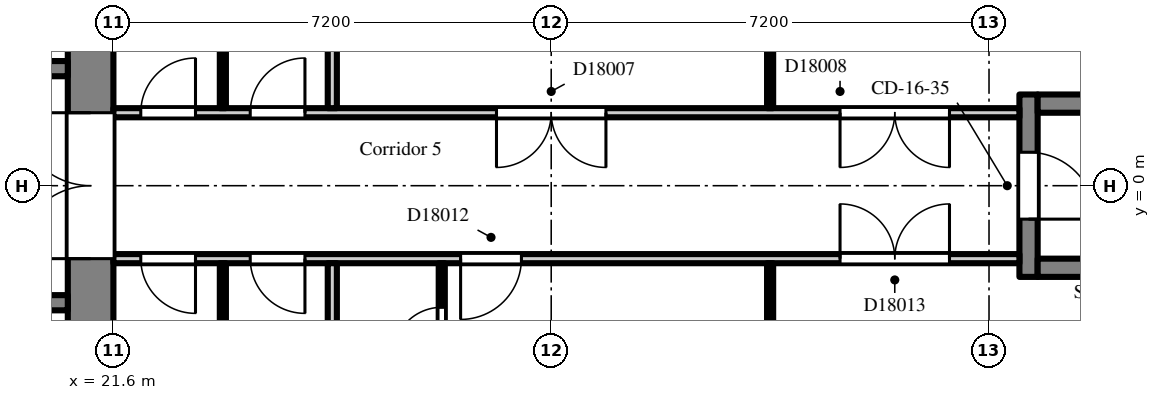
"""IFC4 building model, lengths in metres.
Left out: names, types, materials, properties, quantities, classifications, styles, units other than length and angle.
Written with IfcOpenShell. Run it as: python <this file> out.ifc"""

import sys

from ifc_helpers import new_model, si_unit, direction, frame, frame_2d, origin, place, context, subcontext, project, spatial, rectangle, extrude, element, fill, save


model = new_model("IFC4")
c1 = context("Model", 3, precision=1e-05, world=origin(), true_north=direction((0.0, 1.0)))
c2 = subcontext(c1, "Body", "Model", "MODEL_VIEW")
j1 = project(units=[si_unit("LENGTHUNIT", "METRE"), si_unit("PLANEANGLEUNIT", "RADIAN")], contexts=[c1])
p1 = place(None, origin())
s1 = spatial("IfcSite", under=j1, at=p1, CompositionType="ELEMENT")
p2 = place(p1, origin())
s2 = spatial("IfcBuilding", under=s1, at=p2, CompositionType="ELEMENT")
p3 = place(p2, frame((0.0, 0.0, 123.3)))
s3 = spatial("IfcBuildingStorey", under=s2, at=p3, CompositionType="ELEMENT", Elevation=123.3)
p4 = place(p3, frame((21.225, -7.2, 0.0), z_axis=(0.0, 0.0, 1.0), x_axis=(0.0, 1.0, 0.0)))
e1 = element("IfcWall", 1, at=p4, inside=s3, PredefinedType="SHEAR", context=c2, shape_type="SweptSolid", body=[
    extrude(rectangle(XDim=14.4, YDim=0.75, at=frame_2d((7.2, 0.0))), origin(), (0.0, 0.0, 1.0), 2.6),
])
p5 = place(p4, frame((6.0, 0.0, 0.0)))
e2 = element("IfcOpeningElement", 2, at=p5, cuts=e1, PredefinedType="OPENING", context=c2, shape_type="SweptSolid", body=[
    extrude(rectangle(XDim=2.4, YDim=2.2, at=frame_2d((1.2, 1.1))), frame((0.0, 0.385, 0.0), z_axis=(0.0, -1.0, 0.0), x_axis=(1.0, 0.0, 0.0)), (0.0, 0.0, 1.0), 0.77),
])
p6 = place(p3, frame((7.9, 1.925, 0.0), z_axis=(0.0, 0.0, 1.0), x_axis=(1.0, 0.0, 0.0)))
e3 = element("IfcWall", 3, at=p6, inside=s3, PredefinedType="SHEAR", context=c2, shape_type="SweptSolid", body=[
    extrude(rectangle(XDim=12.95, YDim=0.25, at=frame_2d((6.475, 0.0))), origin(), (0.0, 0.0, 1.0), 2.6),
])
p7 = place(p6, frame((4.825, 0.0, 0.0)))
e4 = element("IfcOpeningElement", 4, at=p7, cuts=e3, PredefinedType="OPENING", context=c2, shape_type="SweptSolid", body=[
    extrude(rectangle(XDim=1.1, YDim=2.1, at=frame_2d((0.55, 1.05))), frame((0.0, 0.135, 0.0), z_axis=(0.0, -1.0, 0.0), x_axis=(1.0, 0.0, 0.0)), (0.0, 0.0, 1.0), 0.27),
])
p8 = place(p6, frame((7.025, 0.0, 0.0)))
e5 = element("IfcOpeningElement", 5, at=p8, cuts=e3, PredefinedType="OPENING", context=c2, shape_type="SweptSolid", body=[
    extrude(rectangle(XDim=1.1, YDim=2.1, at=frame_2d((0.55, 1.05))), frame((0.0, 0.135, 0.0), z_axis=(0.0, -1.0, 0.0), x_axis=(1.0, 0.0, 0.0)), (0.0, 0.0, 1.0), 0.27),
])
p9 = place(p6, frame((9.225, 0.0, 0.0)))
e6 = element("IfcOpeningElement", 6, at=p9, cuts=e3, PredefinedType="OPENING", context=c2, shape_type="SweptSolid", body=[
    extrude(rectangle(XDim=1.1, YDim=2.1, at=frame_2d((0.55, 1.05))), frame((0.0, 0.135, 0.0), z_axis=(0.0, -1.0, 0.0), x_axis=(1.0, 0.0, 0.0)), (0.0, 0.0, 1.0), 0.27),
])
p10 = place(p6, frame((0.525, 0.0, 0.0)))
e7 = element("IfcOpeningElement", 7, at=p10, cuts=e3, PredefinedType="OPENING", context=c2, shape_type="SweptSolid", body=[
    extrude(rectangle(XDim=0.9, YDim=2.1, at=frame_2d((0.45, 1.05))), frame((0.0, 0.135, 0.0), z_axis=(0.0, -1.0, 0.0), x_axis=(1.0, 0.0, 0.0)), (0.0, 0.0, 1.0), 0.27),
])
p11 = place(p6, frame((2.625, 0.0, 0.0)))
e8 = element("IfcOpeningElement", 8, at=p11, cuts=e3, PredefinedType="OPENING", context=c2, shape_type="SweptSolid", body=[
    extrude(rectangle(XDim=1.1, YDim=2.1, at=frame_2d((0.55, 1.05))), frame((0.0, 0.135, 0.0), z_axis=(0.0, -1.0, 0.0), x_axis=(1.0, 0.0, 0.0)), (0.0, 0.0, 1.0), 0.27),
])
p12 = place(p6, frame((11.525, 0.0, 0.0)))
e9 = element("IfcOpeningElement", 9, at=p12, cuts=e3, PredefinedType="OPENING", context=c2, shape_type="SweptSolid", body=[
    extrude(rectangle(XDim=0.9, YDim=2.1, at=frame_2d((0.45, 1.05))), frame((0.0, 0.135, 0.0), z_axis=(0.0, -1.0, 0.0), x_axis=(1.0, 0.0, 0.0)), (0.0, 0.0, 1.0), 0.27),
])
p13 = place(p3, frame((7.9, -1.925, 0.0), z_axis=(0.0, 0.0, 1.0), x_axis=(1.0, 0.0, 0.0)))
e10 = element("IfcWall", 10, at=p13, inside=s3, PredefinedType="SHEAR", context=c2, shape_type="SweptSolid", body=[
    extrude(rectangle(XDim=12.95, YDim=0.25, at=frame_2d((6.475, 0.0))), origin(), (0.0, 0.0, 1.0), 2.6),
])
p14 = place(p13, frame((0.525, 0.0, 0.0)))
e11 = element("IfcOpeningElement", 11, at=p14, cuts=e10, PredefinedType="OPENING", context=c2, shape_type="SweptSolid", body=[
    extrude(rectangle(XDim=0.9, YDim=2.1, at=frame_2d((0.45, 1.05))), frame((0.0, 0.135, 0.0), z_axis=(0.0, -1.0, 0.0), x_axis=(1.0, 0.0, 0.0)), (0.0, 0.0, 1.0), 0.27),
])
p15 = place(p13, frame((2.625, 0.0, 0.0)))
e12 = element("IfcOpeningElement", 12, at=p15, cuts=e10, PredefinedType="OPENING", context=c2, shape_type="SweptSolid", body=[
    extrude(rectangle(XDim=1.1, YDim=2.1, at=frame_2d((0.55, 1.05))), frame((0.0, 0.135, 0.0), z_axis=(0.0, -1.0, 0.0), x_axis=(1.0, 0.0, 0.0)), (0.0, 0.0, 1.0), 0.27),
])
p16 = place(p13, frame((4.925, 0.0, 0.0)))
e13 = element("IfcOpeningElement", 13, at=p16, cuts=e10, PredefinedType="OPENING", context=c2, shape_type="SweptSolid", body=[
    extrude(rectangle(XDim=0.9, YDim=2.1, at=frame_2d((0.45, 1.05))), frame((0.0, 0.135, 0.0), z_axis=(0.0, -1.0, 0.0), x_axis=(1.0, 0.0, 0.0)), (0.0, 0.0, 1.0), 0.27),
])
p17 = place(p13, frame((8.225, 0.0, 0.0)))
e14 = element("IfcOpeningElement", 14, at=p17, cuts=e10, PredefinedType="OPENING", context=c2, shape_type="SweptSolid", body=[
    extrude(rectangle(XDim=0.9, YDim=2.1, at=frame_2d((0.45, 1.05))), frame((0.0, 0.135, 0.0), z_axis=(0.0, -1.0, 0.0), x_axis=(1.0, 0.0, 0.0)), (0.0, 0.0, 1.0), 0.27),
])
p18 = place(p13, frame((11.525, 0.0, 0.0)))
e15 = element("IfcOpeningElement", 15, at=p18, cuts=e10, PredefinedType="OPENING", context=c2, shape_type="SweptSolid", body=[
    extrude(rectangle(XDim=0.9, YDim=2.1, at=frame_2d((0.45, 1.05))), frame((0.0, 0.135, 0.0), z_axis=(0.0, -1.0, 0.0), x_axis=(1.0, 0.0, 0.0)), (0.0, 0.0, 1.0), 0.27),
])
p19 = place(p3, frame((36.65, -1.5, 0.0), z_axis=(0.0, 0.0, 1.0), x_axis=(0.0, 1.0, 0.0)))
e16 = element("IfcWall", 16, at=p19, inside=s3, PredefinedType="SHEAR", context=c2, shape_type="SweptSolid", body=[
    extrude(rectangle(XDim=3.0, YDim=0.3, at=frame_2d((1.5, 0.0))), origin(), (0.0, 0.0, 1.0), 2.6),
])
p20 = place(p19, frame((0.95, 0.0, 0.0)))
e17 = element("IfcOpeningElement", 17, at=p20, cuts=e16, PredefinedType="OPENING", context=c2, shape_type="SweptSolid", body=[
    extrude(rectangle(XDim=1.1, YDim=2.1, at=frame_2d((0.55, 1.05))), frame((0.0, 0.16, 0.0), z_axis=(0.0, -1.0, 0.0), x_axis=(1.0, 0.0, 0.0)), (0.0, 0.0, 1.0), 0.32),
])
for number, where, z_axis, x_axis in (
    (18, (36.8, -1.35, 0.0), (0.0, 0.0, 1.0), (1.0, 0.0, 0.0)),
    (19, (36.8, 1.35, 0.0), (0.0, 0.0, 1.0), (1.0, 0.0, 0.0)),
):
    element("IfcWall", number, at=place(p3, frame(where, z_axis=z_axis, x_axis=x_axis)), inside=s3, PredefinedType="SHEAR", context=c2, shape_type="SweptSolid", body=[
        extrude(rectangle(XDim=5.8, YDim=0.3, at=frame_2d((2.9, 0.0))), origin(), (0.0, 0.0, 1.0), 2.6),
    ])
p21 = place(p3, frame((21.6, -1.2, 0.0), z_axis=(0.0, 0.0, 1.0), x_axis=(1.0, 0.0, 0.0)))
e20 = element("IfcWall", 20, at=p21, inside=s3, PredefinedType="PARTITIONING", context=c2, shape_type="SweptSolid", body=[
    extrude(rectangle(XDim=14.9, YDim=0.15, at=frame_2d((7.45, 0.0))), origin(), (0.0, 0.0, 1.0), 2.6),
])
p22 = place(p21, frame((0.45, 0.0, 0.0)))
e21 = element("IfcOpeningElement", 21, at=p22, cuts=e20, PredefinedType="OPENING", context=c2, shape_type="SweptSolid", body=[
    extrude(rectangle(XDim=0.9, YDim=2.1, at=frame_2d((0.45, 1.05))), frame((0.0, 0.085, 0.0), z_axis=(0.0, -1.0, 0.0), x_axis=(1.0, 0.0, 0.0)), (0.0, 0.0, 1.0), 0.17),
])
p23 = place(p21, frame((2.25, 0.0, 0.0)))
e22 = element("IfcOpeningElement", 22, at=p23, cuts=e20, PredefinedType="OPENING", context=c2, shape_type="SweptSolid", body=[
    extrude(rectangle(XDim=0.9, YDim=2.1, at=frame_2d((0.45, 1.05))), frame((0.0, 0.085, 0.0), z_axis=(0.0, -1.0, 0.0), x_axis=(1.0, 0.0, 0.0)), (0.0, 0.0, 1.0), 0.17),
])
p24 = place(p21, frame((5.71, 0.0, 0.0)))
e23 = element("IfcOpeningElement", 23, at=p24, cuts=e20, PredefinedType="OPENING", context=c2, shape_type="SweptSolid", body=[
    extrude(rectangle(XDim=1.0, YDim=2.1, at=frame_2d((0.5, 1.05))), frame((0.0, 0.085, 0.0), z_axis=(0.0, -1.0, 0.0), x_axis=(1.0, 0.0, 0.0)), (0.0, 0.0, 1.0), 0.17),
])
p25 = place(p21, frame((11.95, 0.0, 0.0)))
e24 = element("IfcOpeningElement", 24, at=p25, cuts=e20, PredefinedType="OPENING", context=c2, shape_type="SweptSolid", body=[
    extrude(rectangle(XDim=1.8, YDim=2.1, at=frame_2d((0.9, 1.05))), frame((0.0, 0.085, 0.0), z_axis=(0.0, -1.0, 0.0), x_axis=(1.0, 0.0, 0.0)), (0.0, 0.0, 1.0), 0.17),
])
p26 = place(p3, frame((21.6, 1.2, 0.0), z_axis=(0.0, 0.0, 1.0), x_axis=(1.0, 0.0, 0.0)))
e25 = element("IfcWall", 25, at=p26, inside=s3, PredefinedType="PARTITIONING", context=c2, shape_type="SweptSolid", body=[
    extrude(rectangle(XDim=14.9, YDim=0.15, at=frame_2d((7.45, 0.0))), origin(), (0.0, 0.0, 1.0), 2.6),
])
p27 = place(p26, frame((0.45, 0.0, 0.0)))
e26 = element("IfcOpeningElement", 26, at=p27, cuts=e25, PredefinedType="OPENING", context=c2, shape_type="SweptSolid", body=[
    extrude(rectangle(XDim=0.9, YDim=2.1, at=frame_2d((0.45, 1.05))), frame((0.0, 0.085, 0.0), z_axis=(0.0, -1.0, 0.0), x_axis=(1.0, 0.0, 0.0)), (0.0, 0.0, 1.0), 0.17),
])
p28 = place(p26, frame((2.25, 0.0, 0.0)))
e27 = element("IfcOpeningElement", 27, at=p28, cuts=e25, PredefinedType="OPENING", context=c2, shape_type="SweptSolid", body=[
    extrude(rectangle(XDim=0.9, YDim=2.1, at=frame_2d((0.45, 1.05))), frame((0.0, 0.085, 0.0), z_axis=(0.0, -1.0, 0.0), x_axis=(1.0, 0.0, 0.0)), (0.0, 0.0, 1.0), 0.17),
])
p29 = place(p26, frame((6.3, 0.0, 0.0)))
e28 = element("IfcOpeningElement", 28, at=p29, cuts=e25, PredefinedType="OPENING", context=c2, shape_type="SweptSolid", body=[
    extrude(rectangle(XDim=1.8, YDim=2.1, at=frame_2d((0.9, 1.05))), frame((0.0, 0.085, 0.0), z_axis=(0.0, -1.0, 0.0), x_axis=(1.0, 0.0, 0.0)), (0.0, 0.0, 1.0), 0.17),
])
p30 = place(p26, frame((11.95, 0.0, 0.0)))
e29 = element("IfcOpeningElement", 29, at=p30, cuts=e25, PredefinedType="OPENING", context=c2, shape_type="SweptSolid", body=[
    extrude(rectangle(XDim=1.8, YDim=2.1, at=frame_2d((0.9, 1.05))), frame((0.0, 0.085, 0.0), z_axis=(0.0, -1.0, 0.0), x_axis=(1.0, 0.0, 0.0)), (0.0, 0.0, 1.0), 0.17),
])
for number, where, z_axis, x_axis in (
    (30, (23.4, -6.9, 0.0), (0.0, 0.0, 1.0), (0.0, 1.0, 0.0)),
    (31, (23.4, 1.275, 0.0), (0.0, 0.0, 1.0), (0.0, 1.0, 0.0)),
):
    element("IfcWall", number, at=place(p3, frame(where, z_axis=z_axis, x_axis=x_axis)), inside=s3, PredefinedType="PARTITIONING", context=c2, shape_type="SweptSolid", body=[
        extrude(rectangle(XDim=5.625, YDim=0.1, at=frame_2d((2.812, 0.0))), origin(), (0.0, 0.0, 1.0), 2.6),
    ])
for number, where, z_axis, x_axis in (
    (32, (25.2, -6.9, 0.0), (0.0, 0.0, 1.0), (0.0, 1.0, 0.0)),
    (33, (25.2, 1.275, 0.0), (0.0, 0.0, 1.0), (0.0, 1.0, 0.0)),
):
    element("IfcWall", number, at=place(p3, frame(where, z_axis=z_axis, x_axis=x_axis)), inside=s3, PredefinedType="PARTITIONING", context=c2, shape_type="SweptSolid", body=[
        extrude(rectangle(XDim=5.625, YDim=0.15, at=frame_2d((2.812, 0.0))), origin(), (0.0, 0.0, 1.0), 2.6),
    ])
p31 = place(p3, frame((27.0, -3.55, 0.0), z_axis=(0.0, 0.0, 1.0), x_axis=(0.0, 1.0, 0.0)))
e34 = element("IfcWall", 34, at=p31, inside=s3, PredefinedType="PARTITIONING", context=c2, shape_type="SweptSolid", body=[
    extrude(rectangle(XDim=2.275, YDim=0.1, at=frame_2d((1.138, 0.0))), origin(), (0.0, 0.0, 1.0), 2.6),
])
p32 = place(p31, frame((0.75, 0.0, 0.0)))
e35 = element("IfcOpeningElement", 35, at=p32, cuts=e34, PredefinedType="OPENING", context=c2, shape_type="SweptSolid", body=[
    extrude(rectangle(XDim=0.8, YDim=2.1, at=frame_2d((0.4, 1.05))), frame((0.0, 0.06, 0.0), z_axis=(0.0, -1.0, 0.0), x_axis=(1.0, 0.0, 0.0)), (0.0, 0.0, 1.0), 0.12),
])
for number, where, z_axis, x_axis in (
    (36, (32.4, -6.9, 0.0), (0.0, 0.0, 1.0), (0.0, 1.0, 0.0)),
    (37, (32.4, 1.275, 0.0), (0.0, 0.0, 1.0), (0.0, 1.0, 0.0)),
):
    element("IfcWall", number, at=place(p3, frame(where, z_axis=z_axis, x_axis=x_axis)), inside=s3, PredefinedType="PARTITIONING", context=c2, shape_type="SweptSolid", body=[
        extrude(rectangle(XDim=5.625, YDim=0.1, at=frame_2d((2.812, 0.0))), origin(), (0.0, 0.0, 1.0), 2.6),
    ])
p33 = place(p5, origin())
e38 = element("IfcDoor", 38, at=p33, inside=s3, OperationType="DOUBLE_DOOR_DOUBLE_SWING", PredefinedType="DOOR", context=c2, shape_type="SweptSolid", body=[
    extrude(rectangle(XDim=2.4, YDim=2.2, at=frame_2d((1.2, 1.1))), frame((0.0, 0.025, 0.0), z_axis=(0.0, -1.0, 0.0), x_axis=(1.0, 0.0, 0.0)), (0.0, 0.0, 1.0), 0.05),
])
fill(e2, e38)
p34 = place(p20, frame((1.1, 0.0, 0.0), z_axis=(0.0, 0.0, 1.0), x_axis=(-1.0, 0.0, 0.0)))
e39 = element("IfcDoor", 39, at=p34, inside=s3, OperationType="SINGLE_SWING_RIGHT", PredefinedType="DOOR", context=c2, shape_type="SweptSolid", body=[
    extrude(rectangle(XDim=1.1, YDim=2.1, at=frame_2d((0.55, 1.05))), frame((0.0, 0.025, 0.0), z_axis=(0.0, -1.0, 0.0), x_axis=(1.0, 0.0, 0.0)), (0.0, 0.0, 1.0), 0.05),
])
fill(e17, e39)
p35 = place(p27, origin())
e40 = element("IfcDoor", 40, at=p35, inside=s3, OperationType="SINGLE_SWING_RIGHT", PredefinedType="DOOR", context=c2, shape_type="SweptSolid", body=[
    extrude(rectangle(XDim=0.9, YDim=2.1, at=frame_2d((0.45, 1.05))), frame((0.0, 0.025, 0.0), z_axis=(0.0, -1.0, 0.0), x_axis=(1.0, 0.0, 0.0)), (0.0, 0.0, 1.0), 0.05),
])
fill(e26, e40)
p36 = place(p28, origin())
e41 = element("IfcDoor", 41, at=p36, inside=s3, OperationType="SINGLE_SWING_RIGHT", PredefinedType="DOOR", context=c2, shape_type="SweptSolid", body=[
    extrude(rectangle(XDim=0.9, YDim=2.1, at=frame_2d((0.45, 1.05))), frame((0.0, 0.025, 0.0), z_axis=(0.0, -1.0, 0.0), x_axis=(1.0, 0.0, 0.0)), (0.0, 0.0, 1.0), 0.05),
])
fill(e27, e41)
p37 = place(p29, frame((1.8, 0.0, 0.0), z_axis=(0.0, 0.0, 1.0), x_axis=(-1.0, 0.0, 0.0)))
e42 = element("IfcDoor", 42, at=p37, inside=s3, OperationType="DOUBLE_DOOR_DOUBLE_SWING", PredefinedType="DOOR", context=c2, shape_type="SweptSolid", body=[
    extrude(rectangle(XDim=1.8, YDim=2.1, at=frame_2d((0.9, 1.05))), frame((0.0, 0.025, 0.0), z_axis=(0.0, -1.0, 0.0), x_axis=(1.0, 0.0, 0.0)), (0.0, 0.0, 1.0), 0.05),
])
fill(e28, e42)
p38 = place(p30, frame((1.8, 0.0, 0.0), z_axis=(0.0, 0.0, 1.0), x_axis=(-1.0, 0.0, 0.0)))
e43 = element("IfcDoor", 43, at=p38, inside=s3, OperationType="DOUBLE_DOOR_DOUBLE_SWING", PredefinedType="DOOR", context=c2, shape_type="SweptSolid", body=[
    extrude(rectangle(XDim=1.8, YDim=2.1, at=frame_2d((0.9, 1.05))), frame((0.0, 0.025, 0.0), z_axis=(0.0, -1.0, 0.0), x_axis=(1.0, 0.0, 0.0)), (0.0, 0.0, 1.0), 0.05),
])
fill(e29, e43)
p39 = place(p22, frame((0.9, 0.0, 0.0), z_axis=(0.0, 0.0, 1.0), x_axis=(-1.0, 0.0, 0.0)))
e44 = element("IfcDoor", 44, at=p39, inside=s3, OperationType="SINGLE_SWING_LEFT", PredefinedType="DOOR", context=c2, shape_type="SweptSolid", body=[
    extrude(rectangle(XDim=0.9, YDim=2.1, at=frame_2d((0.45, 1.05))), frame((0.0, 0.025, 0.0), z_axis=(0.0, -1.0, 0.0), x_axis=(1.0, 0.0, 0.0)), (0.0, 0.0, 1.0), 0.05),
])
fill(e21, e44)
p40 = place(p23, frame((0.9, 0.0, 0.0), z_axis=(0.0, 0.0, 1.0), x_axis=(-1.0, 0.0, 0.0)))
e45 = element("IfcDoor", 45, at=p40, inside=s3, OperationType="SINGLE_SWING_LEFT", PredefinedType="DOOR", context=c2, shape_type="SweptSolid", body=[
    extrude(rectangle(XDim=0.9, YDim=2.1, at=frame_2d((0.45, 1.05))), frame((0.0, 0.025, 0.0), z_axis=(0.0, -1.0, 0.0), x_axis=(1.0, 0.0, 0.0)), (0.0, 0.0, 1.0), 0.05),
])
fill(e22, e45)
p41 = place(p32, origin())
e46 = element("IfcDoor", 46, at=p41, inside=s3, OperationType="SINGLE_SWING_LEFT", PredefinedType="DOOR", context=c2, shape_type="SweptSolid", body=[
    extrude(rectangle(XDim=0.8, YDim=2.1, at=frame_2d((0.4, 1.05))), frame((0.0, 0.025, 0.0), z_axis=(0.0, -1.0, 0.0), x_axis=(1.0, 0.0, 0.0)), (0.0, 0.0, 1.0), 0.05),
])
fill(e35, e46)
p42 = place(p24, frame((1.0, 0.0, 0.0), z_axis=(0.0, 0.0, 1.0), x_axis=(-1.0, 0.0, 0.0)))
e47 = element("IfcDoor", 47, at=p42, inside=s3, OperationType="SINGLE_SWING_RIGHT", PredefinedType="DOOR", context=c2, shape_type="SweptSolid", body=[
    extrude(rectangle(XDim=1.0, YDim=2.1, at=frame_2d((0.5, 1.05))), frame((0.0, 0.025, 0.0), z_axis=(0.0, -1.0, 0.0), x_axis=(1.0, 0.0, 0.0)), (0.0, 0.0, 1.0), 0.05),
])
fill(e23, e47)
p43 = place(p25, origin())
e48 = element("IfcDoor", 48, at=p43, inside=s3, OperationType="DOUBLE_DOOR_DOUBLE_SWING", PredefinedType="DOOR", context=c2, shape_type="SweptSolid", body=[
    extrude(rectangle(XDim=1.8, YDim=2.1, at=frame_2d((0.9, 1.05))), frame((0.0, 0.025, 0.0), z_axis=(0.0, -1.0, 0.0), x_axis=(1.0, 0.0, 0.0)), (0.0, 0.0, 1.0), 0.05),
])
fill(e24, e48)
save(model, sys.argv[1])
